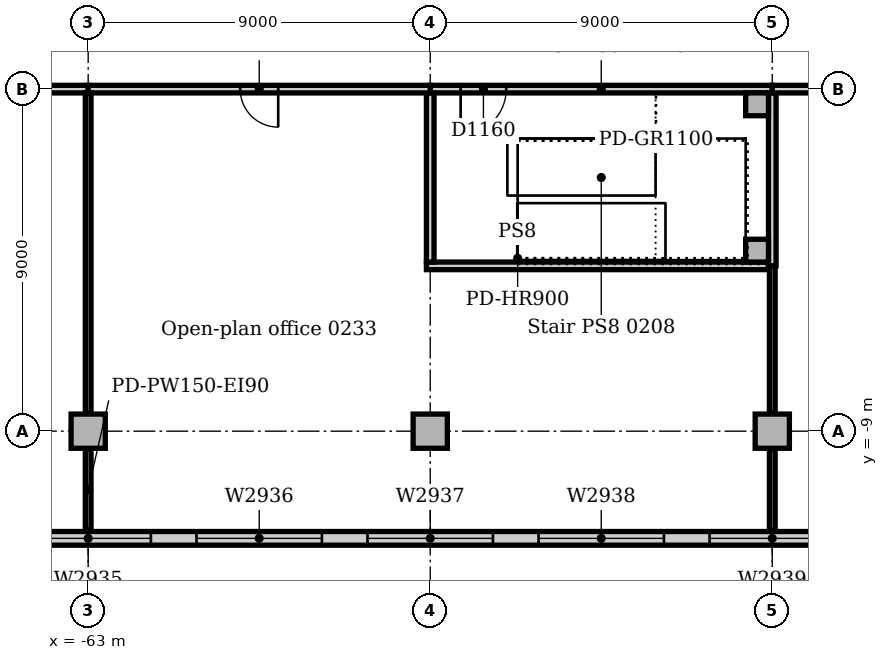
"""IFC4 building model, lengths in metres.
Left out: names, types, materials, properties, quantities, classifications, styles, units other than length and angle.
Written with IfcOpenShell. Run it as: python <this file> out.ifc"""

import sys

from ifc_helpers import new_model, si_unit, direction, frame, frame_2d, origin, origin_2d, place, context, subcontext, project, spatial, rectangle, extrude, element, fill, save


model = new_model("IFC4")
c1 = context("Model", 3, precision=1e-05, world=origin(), true_north=direction((0.0, 1.0)))
c2 = subcontext(c1, "Body", "Model", "MODEL_VIEW")
j1 = project(units=[si_unit("LENGTHUNIT", "METRE"), si_unit("PLANEANGLEUNIT", "RADIAN")], contexts=[c1])
p1 = place(None, origin())
s1 = spatial("IfcSite", under=j1, at=p1, CompositionType="ELEMENT")
p2 = place(p1, origin())
s2 = spatial("IfcBuilding", under=s1, at=p2, CompositionType="ELEMENT")
p3 = place(p2, frame((0.0, 0.0, 11.0)))
s3 = spatial("IfcBuildingStorey", under=s2, at=p3, CompositionType="ELEMENT", Elevation=11.0)
for number, where, z_axis, x_axis in (
    (1, (-63.0, -9.0, 0.0), (0.0, 0.0, 1.0), (1.0, 0.0, 0.0)),
    (2, (-54.0, -9.0, 0.0), (0.0, 0.0, 1.0), (1.0, 0.0, 0.0)),
    (3, (-45.0, -9.0, 0.0), (0.0, 0.0, 1.0), (1.0, 0.0, 0.0)),
):
    element("IfcColumn", number, at=place(p3, frame(where, z_axis=z_axis, x_axis=x_axis)), inside=s3, PredefinedType="COLUMN", context=c2, shape_type="SweptSolid", body=[
        extrude(rectangle(XDim=0.9, YDim=0.9, at=origin_2d()), origin(), (0.0, 0.0, 1.0), 4.7),
    ])
p4 = place(p3, frame((-81.0, -11.82, 0.0), z_axis=(0.0, 0.0, 1.0), x_axis=(1.0, 0.0, 0.0)))
e4 = element("IfcWall", 4, at=p4, inside=s3, PredefinedType="STANDARD", context=c2, shape_type="SweptSolid", body=[
    extrude(rectangle(XDim=144.0, YDim=0.36, at=frame_2d((72.0, 0.0))), origin(), (0.0, 0.0, 1.0), 4.7),
])
p5 = place(p4, frame((2.85, 0.0, 0.9)))
e5 = element("IfcOpeningElement", 5, at=p5, cuts=e4, PredefinedType="OPENING", context=c2, shape_type="SweptSolid", body=[
    extrude(rectangle(XDim=3.3, YDim=2.4, at=frame_2d((1.65, 1.2))), frame((0.0, 0.19, 0.0), z_axis=(0.0, -1.0, 0.0), x_axis=(1.0, 0.0, 0.0)), (0.0, 0.0, 1.0), 0.38),
])
p6 = place(p4, frame((7.35, 0.0, 0.9)))
e6 = element("IfcOpeningElement", 6, at=p6, cuts=e4, PredefinedType="OPENING", context=c2, shape_type="SweptSolid", body=[
    extrude(rectangle(XDim=3.3, YDim=2.4, at=frame_2d((1.65, 1.2))), frame((0.0, 0.19, 0.0), z_axis=(0.0, -1.0, 0.0), x_axis=(1.0, 0.0, 0.0)), (0.0, 0.0, 1.0), 0.38),
])
p7 = place(p4, frame((11.85, 0.0, 0.9)))
e7 = element("IfcOpeningElement", 7, at=p7, cuts=e4, PredefinedType="OPENING", context=c2, shape_type="SweptSolid", body=[
    extrude(rectangle(XDim=3.3, YDim=2.4, at=frame_2d((1.65, 1.2))), frame((0.0, 0.19, 0.0), z_axis=(0.0, -1.0, 0.0), x_axis=(1.0, 0.0, 0.0)), (0.0, 0.0, 1.0), 0.38),
])
p8 = place(p4, frame((16.35, 0.0, 0.9)))
e8 = element("IfcOpeningElement", 8, at=p8, cuts=e4, PredefinedType="OPENING", context=c2, shape_type="SweptSolid", body=[
    extrude(rectangle(XDim=3.3, YDim=2.4, at=frame_2d((1.65, 1.2))), frame((0.0, 0.19, 0.0), z_axis=(0.0, -1.0, 0.0), x_axis=(1.0, 0.0, 0.0)), (0.0, 0.0, 1.0), 0.38),
])
p9 = place(p4, frame((20.85, 0.0, 0.9)))
e9 = element("IfcOpeningElement", 9, at=p9, cuts=e4, PredefinedType="OPENING", context=c2, shape_type="SweptSolid", body=[
    extrude(rectangle(XDim=3.3, YDim=2.4, at=frame_2d((1.65, 1.2))), frame((0.0, 0.19, 0.0), z_axis=(0.0, -1.0, 0.0), x_axis=(1.0, 0.0, 0.0)), (0.0, 0.0, 1.0), 0.38),
])
p10 = place(p4, frame((25.35, 0.0, 0.9)))
e10 = element("IfcOpeningElement", 10, at=p10, cuts=e4, PredefinedType="OPENING", context=c2, shape_type="SweptSolid", body=[
    extrude(rectangle(XDim=3.3, YDim=2.4, at=frame_2d((1.65, 1.2))), frame((0.0, 0.19, 0.0), z_axis=(0.0, -1.0, 0.0), x_axis=(1.0, 0.0, 0.0)), (0.0, 0.0, 1.0), 0.38),
])
p11 = place(p4, frame((29.85, 0.0, 0.9)))
e11 = element("IfcOpeningElement", 11, at=p11, cuts=e4, PredefinedType="OPENING", context=c2, shape_type="SweptSolid", body=[
    extrude(rectangle(XDim=3.3, YDim=2.4, at=frame_2d((1.65, 1.2))), frame((0.0, 0.19, 0.0), z_axis=(0.0, -1.0, 0.0), x_axis=(1.0, 0.0, 0.0)), (0.0, 0.0, 1.0), 0.38),
])
p12 = place(p4, frame((34.35, 0.0, 0.9)))
e12 = element("IfcOpeningElement", 12, at=p12, cuts=e4, PredefinedType="OPENING", context=c2, shape_type="SweptSolid", body=[
    extrude(rectangle(XDim=3.3, YDim=2.4, at=frame_2d((1.65, 1.2))), frame((0.0, 0.19, 0.0), z_axis=(0.0, -1.0, 0.0), x_axis=(1.0, 0.0, 0.0)), (0.0, 0.0, 1.0), 0.38),
])
p13 = place(p4, frame((38.85, 0.0, 0.9)))
e13 = element("IfcOpeningElement", 13, at=p13, cuts=e4, PredefinedType="OPENING", context=c2, shape_type="SweptSolid", body=[
    extrude(rectangle(XDim=3.3, YDim=2.4, at=frame_2d((1.65, 1.2))), frame((0.0, 0.19, 0.0), z_axis=(0.0, -1.0, 0.0), x_axis=(1.0, 0.0, 0.0)), (0.0, 0.0, 1.0), 0.38),
])
p14 = place(p4, frame((43.35, 0.0, 0.9)))
e14 = element("IfcOpeningElement", 14, at=p14, cuts=e4, PredefinedType="OPENING", context=c2, shape_type="SweptSolid", body=[
    extrude(rectangle(XDim=3.3, YDim=2.4, at=frame_2d((1.65, 1.2))), frame((0.0, 0.19, 0.0), z_axis=(0.0, -1.0, 0.0), x_axis=(1.0, 0.0, 0.0)), (0.0, 0.0, 1.0), 0.38),
])
p15 = place(p4, frame((47.85, 0.0, 0.9)))
e15 = element("IfcOpeningElement", 15, at=p15, cuts=e4, PredefinedType="OPENING", context=c2, shape_type="SweptSolid", body=[
    extrude(rectangle(XDim=3.3, YDim=2.4, at=frame_2d((1.65, 1.2))), frame((0.0, 0.19, 0.0), z_axis=(0.0, -1.0, 0.0), x_axis=(1.0, 0.0, 0.0)), (0.0, 0.0, 1.0), 0.38),
])
p16 = place(p4, frame((52.35, 0.0, 0.9)))
e16 = element("IfcOpeningElement", 16, at=p16, cuts=e4, PredefinedType="OPENING", context=c2, shape_type="SweptSolid", body=[
    extrude(rectangle(XDim=3.3, YDim=2.4, at=frame_2d((1.65, 1.2))), frame((0.0, 0.19, 0.0), z_axis=(0.0, -1.0, 0.0), x_axis=(1.0, 0.0, 0.0)), (0.0, 0.0, 1.0), 0.38),
])
p17 = place(p4, frame((56.85, 0.0, 0.9)))
e17 = element("IfcOpeningElement", 17, at=p17, cuts=e4, PredefinedType="OPENING", context=c2, shape_type="SweptSolid", body=[
    extrude(rectangle(XDim=3.3, YDim=2.4, at=frame_2d((1.65, 1.2))), frame((0.0, 0.19, 0.0), z_axis=(0.0, -1.0, 0.0), x_axis=(1.0, 0.0, 0.0)), (0.0, 0.0, 1.0), 0.38),
])
p18 = place(p4, frame((61.35, 0.0, 0.9)))
e18 = element("IfcOpeningElement", 18, at=p18, cuts=e4, PredefinedType="OPENING", context=c2, shape_type="SweptSolid", body=[
    extrude(rectangle(XDim=3.3, YDim=2.4, at=frame_2d((1.65, 1.2))), frame((0.0, 0.19, 0.0), z_axis=(0.0, -1.0, 0.0), x_axis=(1.0, 0.0, 0.0)), (0.0, 0.0, 1.0), 0.38),
])
p19 = place(p4, frame((65.85, 0.0, 0.9)))
e19 = element("IfcOpeningElement", 19, at=p19, cuts=e4, PredefinedType="OPENING", context=c2, shape_type="SweptSolid", body=[
    extrude(rectangle(XDim=3.3, YDim=2.4, at=frame_2d((1.65, 1.2))), frame((0.0, 0.19, 0.0), z_axis=(0.0, -1.0, 0.0), x_axis=(1.0, 0.0, 0.0)), (0.0, 0.0, 1.0), 0.38),
])
p20 = place(p4, frame((70.35, 0.0, 0.9)))
e20 = element("IfcOpeningElement", 20, at=p20, cuts=e4, PredefinedType="OPENING", context=c2, shape_type="SweptSolid", body=[
    extrude(rectangle(XDim=3.3, YDim=2.4, at=frame_2d((1.65, 1.2))), frame((0.0, 0.19, 0.0), z_axis=(0.0, -1.0, 0.0), x_axis=(1.0, 0.0, 0.0)), (0.0, 0.0, 1.0), 0.38),
])
p21 = place(p4, frame((74.85, 0.0, 0.9)))
e21 = element("IfcOpeningElement", 21, at=p21, cuts=e4, PredefinedType="OPENING", context=c2, shape_type="SweptSolid", body=[
    extrude(rectangle(XDim=3.3, YDim=2.4, at=frame_2d((1.65, 1.2))), frame((0.0, 0.19, 0.0), z_axis=(0.0, -1.0, 0.0), x_axis=(1.0, 0.0, 0.0)), (0.0, 0.0, 1.0), 0.38),
])
p22 = place(p4, frame((79.35, 0.0, 0.9)))
e22 = element("IfcOpeningElement", 22, at=p22, cuts=e4, PredefinedType="OPENING", context=c2, shape_type="SweptSolid", body=[
    extrude(rectangle(XDim=3.3, YDim=2.4, at=frame_2d((1.65, 1.2))), frame((0.0, 0.19, 0.0), z_axis=(0.0, -1.0, 0.0), x_axis=(1.0, 0.0, 0.0)), (0.0, 0.0, 1.0), 0.38),
])
p23 = place(p4, frame((83.85, 0.0, 0.9)))
e23 = element("IfcOpeningElement", 23, at=p23, cuts=e4, PredefinedType="OPENING", context=c2, shape_type="SweptSolid", body=[
    extrude(rectangle(XDim=3.3, YDim=2.4, at=frame_2d((1.65, 1.2))), frame((0.0, 0.19, 0.0), z_axis=(0.0, -1.0, 0.0), x_axis=(1.0, 0.0, 0.0)), (0.0, 0.0, 1.0), 0.38),
])
p24 = place(p4, frame((88.35, 0.0, 0.9)))
e24 = element("IfcOpeningElement", 24, at=p24, cuts=e4, PredefinedType="OPENING", context=c2, shape_type="SweptSolid", body=[
    extrude(rectangle(XDim=3.3, YDim=2.4, at=frame_2d((1.65, 1.2))), frame((0.0, 0.19, 0.0), z_axis=(0.0, -1.0, 0.0), x_axis=(1.0, 0.0, 0.0)), (0.0, 0.0, 1.0), 0.38),
])
p25 = place(p4, frame((92.85, 0.0, 0.9)))
e25 = element("IfcOpeningElement", 25, at=p25, cuts=e4, PredefinedType="OPENING", context=c2, shape_type="SweptSolid", body=[
    extrude(rectangle(XDim=3.3, YDim=2.4, at=frame_2d((1.65, 1.2))), frame((0.0, 0.19, 0.0), z_axis=(0.0, -1.0, 0.0), x_axis=(1.0, 0.0, 0.0)), (0.0, 0.0, 1.0), 0.38),
])
p26 = place(p4, frame((97.35, 0.0, 0.9)))
e26 = element("IfcOpeningElement", 26, at=p26, cuts=e4, PredefinedType="OPENING", context=c2, shape_type="SweptSolid", body=[
    extrude(rectangle(XDim=3.3, YDim=2.4, at=frame_2d((1.65, 1.2))), frame((0.0, 0.19, 0.0), z_axis=(0.0, -1.0, 0.0), x_axis=(1.0, 0.0, 0.0)), (0.0, 0.0, 1.0), 0.38),
])
p27 = place(p4, frame((101.85, 0.0, 0.9)))
e27 = element("IfcOpeningElement", 27, at=p27, cuts=e4, PredefinedType="OPENING", context=c2, shape_type="SweptSolid", body=[
    extrude(rectangle(XDim=3.3, YDim=2.4, at=frame_2d((1.65, 1.2))), frame((0.0, 0.19, 0.0), z_axis=(0.0, -1.0, 0.0), x_axis=(1.0, 0.0, 0.0)), (0.0, 0.0, 1.0), 0.38),
])
p28 = place(p4, frame((106.35, 0.0, 0.9)))
e28 = element("IfcOpeningElement", 28, at=p28, cuts=e4, PredefinedType="OPENING", context=c2, shape_type="SweptSolid", body=[
    extrude(rectangle(XDim=3.3, YDim=2.4, at=frame_2d((1.65, 1.2))), frame((0.0, 0.19, 0.0), z_axis=(0.0, -1.0, 0.0), x_axis=(1.0, 0.0, 0.0)), (0.0, 0.0, 1.0), 0.38),
])
p29 = place(p4, frame((110.85, 0.0, 0.9)))
e29 = element("IfcOpeningElement", 29, at=p29, cuts=e4, PredefinedType="OPENING", context=c2, shape_type="SweptSolid", body=[
    extrude(rectangle(XDim=3.3, YDim=2.4, at=frame_2d((1.65, 1.2))), frame((0.0, 0.19, 0.0), z_axis=(0.0, -1.0, 0.0), x_axis=(1.0, 0.0, 0.0)), (0.0, 0.0, 1.0), 0.38),
])
p30 = place(p4, frame((115.35, 0.0, 0.9)))
e30 = element("IfcOpeningElement", 30, at=p30, cuts=e4, PredefinedType="OPENING", context=c2, shape_type="SweptSolid", body=[
    extrude(rectangle(XDim=3.3, YDim=2.4, at=frame_2d((1.65, 1.2))), frame((0.0, 0.19, 0.0), z_axis=(0.0, -1.0, 0.0), x_axis=(1.0, 0.0, 0.0)), (0.0, 0.0, 1.0), 0.38),
])
p31 = place(p4, frame((119.85, 0.0, 0.9)))
e31 = element("IfcOpeningElement", 31, at=p31, cuts=e4, PredefinedType="OPENING", context=c2, shape_type="SweptSolid", body=[
    extrude(rectangle(XDim=3.3, YDim=2.4, at=frame_2d((1.65, 1.2))), frame((0.0, 0.19, 0.0), z_axis=(0.0, -1.0, 0.0), x_axis=(1.0, 0.0, 0.0)), (0.0, 0.0, 1.0), 0.38),
])
p32 = place(p4, frame((124.35, 0.0, 0.9)))
e32 = element("IfcOpeningElement", 32, at=p32, cuts=e4, PredefinedType="OPENING", context=c2, shape_type="SweptSolid", body=[
    extrude(rectangle(XDim=3.3, YDim=2.4, at=frame_2d((1.65, 1.2))), frame((0.0, 0.19, 0.0), z_axis=(0.0, -1.0, 0.0), x_axis=(1.0, 0.0, 0.0)), (0.0, 0.0, 1.0), 0.38),
])
p33 = place(p4, frame((128.85, 0.0, 0.9)))
e33 = element("IfcOpeningElement", 33, at=p33, cuts=e4, PredefinedType="OPENING", context=c2, shape_type="SweptSolid", body=[
    extrude(rectangle(XDim=3.3, YDim=2.4, at=frame_2d((1.65, 1.2))), frame((0.0, 0.19, 0.0), z_axis=(0.0, -1.0, 0.0), x_axis=(1.0, 0.0, 0.0)), (0.0, 0.0, 1.0), 0.38),
])
p34 = place(p4, frame((133.35, 0.0, 0.9)))
e34 = element("IfcOpeningElement", 34, at=p34, cuts=e4, PredefinedType="OPENING", context=c2, shape_type="SweptSolid", body=[
    extrude(rectangle(XDim=3.3, YDim=2.4, at=frame_2d((1.65, 1.2))), frame((0.0, 0.19, 0.0), z_axis=(0.0, -1.0, 0.0), x_axis=(1.0, 0.0, 0.0)), (0.0, 0.0, 1.0), 0.38),
])
p35 = place(p4, frame((137.85, 0.0, 0.9)))
e35 = element("IfcOpeningElement", 35, at=p35, cuts=e4, PredefinedType="OPENING", context=c2, shape_type="SweptSolid", body=[
    extrude(rectangle(XDim=3.3, YDim=2.4, at=frame_2d((1.65, 1.2))), frame((0.0, 0.19, 0.0), z_axis=(0.0, -1.0, 0.0), x_axis=(1.0, 0.0, 0.0)), (0.0, 0.0, 1.0), 0.38),
])
for number, where, z_axis, x_axis in (
    (36, (-45.4, -4.25, 0.0), (0.0, 0.0, 1.0), (1.0, 0.0, 0.0)),
    (37, (-45.4, -0.4, 0.0), (0.0, 0.0, 1.0), (1.0, 0.0, 0.0)),
):
    element("IfcColumn", number, at=place(p3, frame(where, z_axis=z_axis, x_axis=x_axis)), inside=s3, PredefinedType="COLUMN", context=c2, shape_type="SweptSolid", body=[
        extrude(rectangle(XDim=0.6, YDim=0.6, at=origin_2d()), origin(), (0.0, 0.0, 1.0), 5.0),
    ])
p36 = place(p3, frame((-54.0, 0.0, 0.0), z_axis=(0.0, 0.0, 1.0), x_axis=(1.0, 0.0, 0.0)))
e38 = element("IfcWall", 38, at=p36, inside=s3, PredefinedType="SOLIDWALL", context=c2, shape_type="SweptSolid", body=[
    extrude(rectangle(XDim=9.0, YDim=0.2, at=frame_2d((4.5, 0.0))), origin(), (0.0, 0.0, 1.0), 4.7),
])
p37 = place(p36, frame((0.8, 0.0, 0.0)))
e39 = element("IfcOpeningElement", 39, at=p37, cuts=e38, PredefinedType="OPENING", context=c2, shape_type="SweptSolid", body=[
    extrude(rectangle(XDim=1.2, YDim=2.1, at=frame_2d((0.6, 1.05))), frame((0.0, 0.11, 0.0), z_axis=(0.0, -1.0, 0.0), x_axis=(1.0, 0.0, 0.0)), (0.0, 0.0, 1.0), 0.22),
])
p38 = place(p3, frame((-54.1, -4.65, 0.0), z_axis=(0.0, 0.0, 1.0), x_axis=(1.0, 0.0, 0.0)))
e40 = element("IfcWall", 40, at=p38, inside=s3, PredefinedType="SOLIDWALL", context=c2, shape_type="SweptSolid", body=[
    extrude(rectangle(XDim=9.0, YDim=0.2, at=frame_2d((4.5, 0.0))), origin(), (0.0, 0.0, 1.0), 4.7),
])
p39 = place(p3, frame((-54.0, -4.55, 0.0), z_axis=(0.0, 0.0, 1.0), x_axis=(0.0, 1.0, 0.0)))
e41 = element("IfcWall", 41, at=p39, inside=s3, PredefinedType="SOLIDWALL", context=c2, shape_type="SweptSolid", body=[
    extrude(rectangle(XDim=4.45, YDim=0.2, at=frame_2d((2.225, 0.0))), origin(), (0.0, 0.0, 1.0), 4.7),
])
p40 = place(p3, frame((-45.0, -4.65, 0.0), z_axis=(0.0, 0.0, 1.0), x_axis=(0.0, 1.0, 0.0)))
e42 = element("IfcWall", 42, at=p40, inside=s3, PredefinedType="SOLIDWALL", context=c2, shape_type="SweptSolid", body=[
    extrude(rectangle(XDim=4.55, YDim=0.2, at=frame_2d((2.275, 0.0))), origin(), (0.0, 0.0, 1.0), 4.7),
])
p41 = place(p3, frame((-71.53, 0.0, 0.0), z_axis=(0.0, 0.0, 1.0), x_axis=(1.0, 0.0, 0.0)))
e43 = element("IfcWall", 43, at=p41, inside=s3, PredefinedType="PARTITIONING", context=c2, shape_type="SweptSolid", body=[
    extrude(rectangle(XDim=8.53, YDim=0.2, at=frame_2d((4.265, 0.0))), origin(), (0.0, 0.0, 1.0), 4.7),
])
p42 = place(p41, frame((3.53, 0.0, 0.0)))
e44 = element("IfcOpeningElement", 44, at=p42, cuts=e43, PredefinedType="OPENING", context=c2, shape_type="SweptSolid", body=[
    extrude(rectangle(XDim=1.0, YDim=2.1, at=frame_2d((0.5, 1.05))), frame((0.0, 0.11, 0.0), z_axis=(0.0, -1.0, 0.0), x_axis=(1.0, 0.0, 0.0)), (0.0, 0.0, 1.0), 0.22),
])
p43 = place(p3, frame((-63.0, 0.0, 0.0), z_axis=(0.0, 0.0, 1.0), x_axis=(1.0, 0.0, 0.0)))
e45 = element("IfcWall", 45, at=p43, inside=s3, PredefinedType="PARTITIONING", context=c2, shape_type="SweptSolid", body=[
    extrude(rectangle(XDim=9.0, YDim=0.2, at=frame_2d((4.5, 0.0))), origin(), (0.0, 0.0, 1.0), 4.7),
])
p44 = place(p43, frame((4.0, 0.0, 0.0)))
e46 = element("IfcOpeningElement", 46, at=p44, cuts=e45, PredefinedType="OPENING", context=c2, shape_type="SweptSolid", body=[
    extrude(rectangle(XDim=1.0, YDim=2.1, at=frame_2d((0.5, 1.05))), frame((0.0, 0.11, 0.0), z_axis=(0.0, -1.0, 0.0), x_axis=(1.0, 0.0, 0.0)), (0.0, 0.0, 1.0), 0.22),
])
p45 = place(p3, frame((-45.0, 0.0, 0.0), z_axis=(0.0, 0.0, 1.0), x_axis=(1.0, 0.0, 0.0)))
e47 = element("IfcWall", 47, at=p45, inside=s3, PredefinedType="PARTITIONING", context=c2, shape_type="SweptSolid", body=[
    extrude(rectangle(XDim=9.0, YDim=0.2, at=frame_2d((4.5, 0.0))), origin(), (0.0, 0.0, 1.0), 4.7),
])
p46 = place(p45, frame((4.0, 0.0, 0.0)))
e48 = element("IfcOpeningElement", 48, at=p46, cuts=e47, PredefinedType="OPENING", context=c2, shape_type="SweptSolid", body=[
    extrude(rectangle(XDim=1.0, YDim=2.1, at=frame_2d((0.5, 1.05))), frame((0.0, 0.11, 0.0), z_axis=(0.0, -1.0, 0.0), x_axis=(1.0, 0.0, 0.0)), (0.0, 0.0, 1.0), 0.22),
])
p47 = place(p3, frame((-63.0, -11.6, 0.0), z_axis=(0.0, 0.0, 1.0), x_axis=(0.0, 1.0, 0.0)))
e49 = element("IfcWall", 49, at=p47, inside=s3, PredefinedType="PARTITIONING", context=c2, shape_type="SweptSolid", body=[
    extrude(rectangle(XDim=2.13, YDim=0.15, at=frame_2d((1.065, 0.0))), origin(), (0.0, 0.0, 1.0), 4.7),
])
p48 = place(p3, frame((-63.0, -8.53, 0.0), z_axis=(0.0, 0.0, 1.0), x_axis=(0.0, 1.0, 0.0)))
e50 = element("IfcWall", 50, at=p48, inside=s3, PredefinedType="PARTITIONING", context=c2, shape_type="SweptSolid", body=[
    extrude(rectangle(XDim=8.43, YDim=0.15, at=frame_2d((4.215, 0.0))), origin(), (0.0, 0.0, 1.0), 4.7),
])
p49 = place(p3, frame((-45.0, -11.6, 0.0), z_axis=(0.0, 0.0, 1.0), x_axis=(0.0, 1.0, 0.0)))
e51 = element("IfcWall", 51, at=p49, inside=s3, PredefinedType="PARTITIONING", context=c2, shape_type="SweptSolid", body=[
    extrude(rectangle(XDim=2.13, YDim=0.15, at=frame_2d((1.065, 0.0))), origin(), (0.0, 0.0, 1.0), 4.7),
])
p50 = place(p3, frame((-45.0, -8.53, 0.0), z_axis=(0.0, 0.0, 1.0), x_axis=(0.0, 1.0, 0.0)))
e52 = element("IfcWall", 52, at=p50, inside=s3, PredefinedType="PARTITIONING", context=c2, shape_type="SweptSolid", body=[
    extrude(rectangle(XDim=3.88, YDim=0.15, at=frame_2d((1.94, 0.0))), origin(), (0.0, 0.0, 1.0), 4.7),
])
p51 = place(p8, origin())
e53 = element("IfcWindow", 53, at=p51, inside=s3, PartitioningType="SINGLE_PANEL", PredefinedType="WINDOW", context=c2, shape_type="SweptSolid", body=[
    extrude(rectangle(XDim=3.3, YDim=2.4, at=frame_2d((1.65, 1.2))), frame((0.0, 0.13, 0.0), z_axis=(0.0, -1.0, 0.0), x_axis=(1.0, 0.0, 0.0)), (0.0, 0.0, 1.0), 0.06),
])
fill(e8, e53)
p52 = place(p9, origin())
e54 = element("IfcWindow", 54, at=p52, inside=s3, PartitioningType="SINGLE_PANEL", PredefinedType="WINDOW", context=c2, shape_type="SweptSolid", body=[
    extrude(rectangle(XDim=3.3, YDim=2.4, at=frame_2d((1.65, 1.2))), frame((0.0, 0.13, 0.0), z_axis=(0.0, -1.0, 0.0), x_axis=(1.0, 0.0, 0.0)), (0.0, 0.0, 1.0), 0.06),
])
fill(e9, e54)
p53 = place(p10, origin())
e55 = element("IfcWindow", 55, at=p53, inside=s3, PartitioningType="SINGLE_PANEL", PredefinedType="WINDOW", context=c2, shape_type="SweptSolid", body=[
    extrude(rectangle(XDim=3.3, YDim=2.4, at=frame_2d((1.65, 1.2))), frame((0.0, 0.13, 0.0), z_axis=(0.0, -1.0, 0.0), x_axis=(1.0, 0.0, 0.0)), (0.0, 0.0, 1.0), 0.06),
])
fill(e10, e55)
p54 = place(p11, origin())
e56 = element("IfcWindow", 56, at=p54, inside=s3, PartitioningType="SINGLE_PANEL", PredefinedType="WINDOW", context=c2, shape_type="SweptSolid", body=[
    extrude(rectangle(XDim=3.3, YDim=2.4, at=frame_2d((1.65, 1.2))), frame((0.0, 0.13, 0.0), z_axis=(0.0, -1.0, 0.0), x_axis=(1.0, 0.0, 0.0)), (0.0, 0.0, 1.0), 0.06),
])
fill(e11, e56)
p55 = place(p12, origin())
e57 = element("IfcWindow", 57, at=p55, inside=s3, PartitioningType="SINGLE_PANEL", PredefinedType="WINDOW", context=c2, shape_type="SweptSolid", body=[
    extrude(rectangle(XDim=3.3, YDim=2.4, at=frame_2d((1.65, 1.2))), frame((0.0, 0.13, 0.0), z_axis=(0.0, -1.0, 0.0), x_axis=(1.0, 0.0, 0.0)), (0.0, 0.0, 1.0), 0.06),
])
fill(e12, e57)
p56 = place(p44, frame((1.0, 0.0, 0.0), z_axis=(0.0, 0.0, 1.0), x_axis=(-1.0, 0.0, 0.0)))
e58 = element("IfcDoor", 58, at=p56, inside=s3, OperationType="SINGLE_SWING_LEFT", PredefinedType="DOOR", context=c2, shape_type="SweptSolid", body=[
    extrude(rectangle(XDim=1.0, YDim=2.1, at=frame_2d((0.5, 1.05))), frame((0.0, 0.025, 0.0), z_axis=(0.0, -1.0, 0.0), x_axis=(1.0, 0.0, 0.0)), (0.0, 0.0, 1.0), 0.05),
])
fill(e46, e58)
p57 = place(p37, frame((1.2, 0.0, 0.0), z_axis=(0.0, 0.0, 1.0), x_axis=(-1.0, 0.0, 0.0)))
e59 = element("IfcDoor", 59, at=p57, inside=s3, OperationType="SINGLE_SWING_RIGHT", PredefinedType="DOOR", context=c2, shape_type="SweptSolid", body=[
    extrude(rectangle(XDim=1.2, YDim=2.1, at=frame_2d((0.6, 1.05))), frame((0.0, 0.025, 0.0), z_axis=(0.0, -1.0, 0.0), x_axis=(1.0, 0.0, 0.0)), (0.0, 0.0, 1.0), 0.05),
])
fill(e39, e59)
save(model, sys.argv[1])
